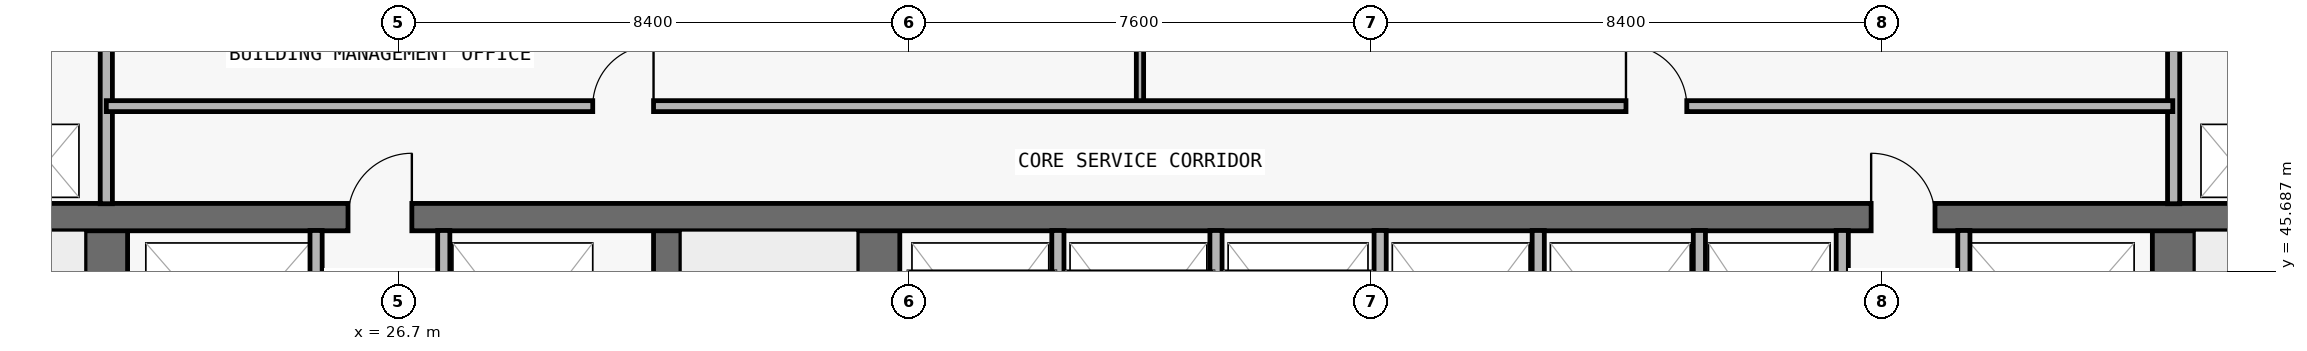
"""IFC4 building model, lengths in metres.
Left out: names, types, materials, properties, quantities, classifications, styles, units other than length and angle.
Written with IfcOpenShell. Run it as: python <this file> out.ifc"""

import sys

from ifc_helpers import new_model, si_unit, direction, frame, frame_2d, origin, place, context, subcontext, project, spatial, rectangle, extrude, element, fill, save


model = new_model("IFC4")
c1 = context("Model", 3, precision=1e-05, world=origin(), true_north=direction((0.0, 1.0)))
c2 = subcontext(c1, "Body", "Model", "MODEL_VIEW")
j1 = project(units=[si_unit("LENGTHUNIT", "METRE"), si_unit("PLANEANGLEUNIT", "RADIAN")], contexts=[c1])
p1 = place(None, origin())
s1 = spatial("IfcSite", under=j1, at=p1, CompositionType="ELEMENT")
p2 = place(p1, origin())
s2 = spatial("IfcBuilding", under=s1, at=p2, CompositionType="ELEMENT")
p3 = place(p2, frame((0.0, 0.0, 33.3)))
s3 = spatial("IfcBuildingStorey", under=s2, at=p3, CompositionType="ELEMENT", Elevation=33.3)
p4 = place(p3, frame((21.9, 36.9, 0.0), z_axis=(0.0, 0.0, 1.0), x_axis=(0.0, 1.0, 0.0)))
e1 = element("IfcWall", 1, at=p4, inside=s3, PredefinedType="SHEAR", context=c2, shape_type="SweptSolid", body=[
    extrude(rectangle(XDim=9.675, YDim=0.7, at=frame_2d((4.837, 0.0))), origin(), (0.0, 0.0, 1.0), 3.05),
])
p5 = place(p4, frame((0.65, 0.0, 0.0)))
e2 = element("IfcOpeningElement", 2, at=p5, cuts=e1, PredefinedType="OPENING", context=c2, shape_type="SweptSolid", body=[
    extrude(rectangle(XDim=1.1, YDim=2.15, at=frame_2d((0.55, 1.075))), frame((0.0, 0.36, 0.0), z_axis=(0.0, -1.0, 0.0), x_axis=(1.0, 0.0, 0.0)), (0.0, 0.0, 1.0), 0.72),
])
p6 = place(p3, frame((55.9, 36.9, 0.0), z_axis=(0.0, 0.0, 1.0), x_axis=(0.0, 1.0, 0.0)))
e3 = element("IfcWall", 3, at=p6, inside=s3, PredefinedType="SHEAR", context=c2, shape_type="SweptSolid", body=[
    extrude(rectangle(XDim=9.675, YDim=0.7, at=frame_2d((4.837, 0.0))), origin(), (0.0, 0.0, 1.0), 3.05),
])
p7 = place(p6, frame((0.65, 0.0, 0.0)))
e4 = element("IfcOpeningElement", 4, at=p7, cuts=e3, PredefinedType="OPENING", context=c2, shape_type="SweptSolid", body=[
    extrude(rectangle(XDim=1.1, YDim=2.15, at=frame_2d((0.55, 1.075))), frame((0.0, 0.36, 0.0), z_axis=(0.0, -1.0, 0.0), x_axis=(1.0, 0.0, 0.0)), (0.0, 0.0, 1.0), 0.72),
])
p8 = place(p3, frame((31.125, 36.9, 0.0), z_axis=(0.0, 0.0, 1.0), x_axis=(0.0, 1.0, 0.0)))
e5 = element("IfcWall", 5, at=p8, inside=s3, PredefinedType="SHEAR", context=c2, shape_type="SweptSolid", body=[
    extrude(rectangle(XDim=9.675, YDim=0.45, at=frame_2d((4.837, 0.0))), origin(), (0.0, 0.0, 1.0), 3.05),
])
p9 = place(p3, frame((34.6, 36.9, 0.0), z_axis=(0.0, 0.0, 1.0), x_axis=(0.0, 1.0, 0.0)))
e6 = element("IfcWall", 6, at=p9, inside=s3, PredefinedType="SHEAR", context=c2, shape_type="SweptSolid", body=[
    extrude(rectangle(XDim=9.675, YDim=0.7, at=frame_2d((4.837, 0.0))), origin(), (0.0, 0.0, 1.0), 3.05),
])
p10 = place(p3, frame((18.2, 46.575, 0.0), z_axis=(0.0, 0.0, 1.0), x_axis=(1.0, 0.0, 0.0)))
e7 = element("IfcWall", 7, at=p10, inside=s3, PredefinedType="SHEAR", context=c2, shape_type="SweptSolid", body=[
    extrude(rectangle(XDim=41.4, YDim=0.45, at=frame_2d((20.7, 0.0))), origin(), (0.0, 0.0, 1.0), 3.05),
])
p11 = place(p10, frame((7.675, 0.0, 0.0)))
e8 = element("IfcOpeningElement", 8, at=p11, cuts=e7, PredefinedType="OPENING", context=c2, shape_type="SweptSolid", body=[
    extrude(rectangle(XDim=1.05, YDim=2.15, at=frame_2d((0.525, 1.075))), frame((0.0, 0.235, 0.0), z_axis=(0.0, -1.0, 0.0), x_axis=(1.0, 0.0, 0.0)), (0.0, 0.0, 1.0), 0.47),
])
p12 = place(p10, frame((32.725, 0.0, 0.0)))
e9 = element("IfcOpeningElement", 9, at=p12, cuts=e7, PredefinedType="OPENING", context=c2, shape_type="SweptSolid", body=[
    extrude(rectangle(XDim=1.05, YDim=2.15, at=frame_2d((0.525, 1.075))), frame((0.0, 0.235, 0.0), z_axis=(0.0, -1.0, 0.0), x_axis=(1.0, 0.0, 0.0)), (0.0, 0.0, 1.0), 0.47),
])
p13 = place(p3, frame((21.9, 46.795, 0.0), z_axis=(0.0, 0.0, 1.0), x_axis=(0.0, 1.0, 0.0)))
e10 = element("IfcWall", 10, at=p13, inside=s3, PredefinedType="PARTITIONING", context=c2, shape_type="SweptSolid", body=[
    extrude(rectangle(XDim=3.06, YDim=0.2, at=frame_2d((1.53, 0.0))), origin(), (0.0, 0.0, 1.0), 3.05),
])
for number, where, z_axis, x_axis in (
    (11, (25.35, 43.17, 0.0), (0.0, 0.0, 1.0), (0.0, 1.0, 0.0)),
    (12, (27.45, 43.17, 0.0), (0.0, 0.0, 1.0), (0.0, 1.0, 0.0)),
    (13, (37.55, 43.17, 0.0), (0.0, 0.0, 1.0), (0.0, 1.0, 0.0)),
):
    element("IfcWall", number, at=place(p3, frame(where, z_axis=z_axis, x_axis=x_axis)), inside=s3, PredefinedType="PARTITIONING", context=c2, shape_type="SweptSolid", body=[
        extrude(rectangle(XDim=3.185, YDim=0.2, at=frame_2d((1.593, 0.0))), origin(), (0.0, 0.0, 1.0), 3.05),
    ])
p14 = place(p3, frame((38.9, 48.4, 0.0), z_axis=(0.0, 0.0, 1.0), x_axis=(0.0, 1.0, 0.0)))
e14 = element("IfcWall", 14, at=p14, inside=s3, PredefinedType="PARTITIONING", context=c2, shape_type="SweptSolid", body=[
    extrude(rectangle(XDim=1.455, YDim=0.12, at=frame_2d((0.728, 0.0))), origin(), (0.0, 0.0, 1.0), 3.05),
])
for number, where, z_axis, x_axis in (
    (15, (40.15, 43.17, 0.0), (0.0, 0.0, 1.0), (0.0, 1.0, 0.0)),
    (16, (42.85, 43.17, 0.0), (0.0, 0.0, 1.0), (0.0, 1.0, 0.0)),
    (17, (45.45, 43.17, 0.0), (0.0, 0.0, 1.0), (0.0, 1.0, 0.0)),
    (18, (48.1, 43.17, 0.0), (0.0, 0.0, 1.0), (0.0, 1.0, 0.0)),
    (19, (50.45, 43.17, 0.0), (0.0, 0.0, 1.0), (0.0, 1.0, 0.0)),
    (20, (52.45, 43.17, 0.0), (0.0, 0.0, 1.0), (0.0, 1.0, 0.0)),
):
    element("IfcWall", number, at=place(p3, frame(where, z_axis=z_axis, x_axis=x_axis)), inside=s3, PredefinedType="PARTITIONING", context=c2, shape_type="SweptSolid", body=[
        extrude(rectangle(XDim=3.185, YDim=0.2, at=frame_2d((1.593, 0.0))), origin(), (0.0, 0.0, 1.0), 3.05),
    ])
p15 = place(p3, frame((55.9, 46.795, 0.0), z_axis=(0.0, 0.0, 1.0), x_axis=(0.0, 1.0, 0.0)))
e21 = element("IfcWall", 21, at=p15, inside=s3, PredefinedType="PARTITIONING", context=c2, shape_type="SweptSolid", body=[
    extrude(rectangle(XDim=3.06, YDim=0.2, at=frame_2d((1.53, 0.0))), origin(), (0.0, 0.0, 1.0), 3.05),
])
p16 = place(p3, frame((21.9, 48.4, 0.0), z_axis=(0.0, 0.0, 1.0), x_axis=(1.0, 0.0, 0.0)))
e22 = element("IfcWall", 22, at=p16, inside=s3, PredefinedType="PARTITIONING", context=c2, shape_type="SweptSolid", body=[
    extrude(rectangle(XDim=33.986, YDim=0.18, at=frame_2d((16.993, 0.0))), origin(), (0.0, 0.0, 1.0), 3.05),
])
p17 = place(p16, frame((8.0, 0.0, 0.0)))
e23 = element("IfcOpeningElement", 23, at=p17, cuts=e22, PredefinedType="OPENING", context=c2, shape_type="SweptSolid", body=[
    extrude(rectangle(XDim=1.0, YDim=2.2, at=frame_2d((0.5, 1.1))), frame((0.0, 0.1, 0.0), z_axis=(0.0, -1.0, 0.0), x_axis=(1.0, 0.0, 0.0)), (0.0, 0.0, 1.0), 0.2),
])
p18 = place(p16, frame((24.993, 0.0, 0.0)))
e24 = element("IfcOpeningElement", 24, at=p18, cuts=e22, PredefinedType="OPENING", context=c2, shape_type="SweptSolid", body=[
    extrude(rectangle(XDim=1.0, YDim=2.2, at=frame_2d((0.5, 1.1))), frame((0.0, 0.1, 0.0), z_axis=(0.0, -1.0, 0.0), x_axis=(1.0, 0.0, 0.0)), (0.0, 0.0, 1.0), 0.2),
])
p19 = place(p11, origin())
e25 = element("IfcDoor", 25, at=p19, inside=s3, OperationType="SINGLE_SWING_RIGHT", PredefinedType="DOOR", context=c2, shape_type="SweptSolid", body=[
    extrude(rectangle(XDim=1.05, YDim=2.15, at=frame_2d((0.525, 1.075))), frame((0.0, 0.025, 0.0), z_axis=(0.0, -1.0, 0.0), x_axis=(1.0, 0.0, 0.0)), (0.0, 0.0, 1.0), 0.05),
])
fill(e8, e25)
p20 = place(p12, origin())
e26 = element("IfcDoor", 26, at=p20, inside=s3, OperationType="SINGLE_SWING_LEFT", PredefinedType="DOOR", context=c2, shape_type="SweptSolid", body=[
    extrude(rectangle(XDim=1.05, YDim=2.15, at=frame_2d((0.525, 1.075))), frame((0.0, 0.025, 0.0), z_axis=(0.0, -1.0, 0.0), x_axis=(1.0, 0.0, 0.0)), (0.0, 0.0, 1.0), 0.05),
])
fill(e9, e26)
p21 = place(p17, origin())
e27 = element("IfcDoor", 27, at=p21, inside=s3, OperationType="SINGLE_SWING_RIGHT", PredefinedType="DOOR", context=c2, shape_type="SweptSolid", body=[
    extrude(rectangle(XDim=1.0, YDim=2.2, at=frame_2d((0.5, 1.1))), frame((0.0, 0.025, 0.0), z_axis=(0.0, -1.0, 0.0), x_axis=(1.0, 0.0, 0.0)), (0.0, 0.0, 1.0), 0.05),
])
fill(e23, e27)
p22 = place(p18, origin())
e28 = element("IfcDoor", 28, at=p22, inside=s3, OperationType="SINGLE_SWING_LEFT", PredefinedType="DOOR", context=c2, shape_type="SweptSolid", body=[
    extrude(rectangle(XDim=1.0, YDim=2.2, at=frame_2d((0.5, 1.1))), frame((0.0, 0.025, 0.0), z_axis=(0.0, -1.0, 0.0), x_axis=(1.0, 0.0, 0.0)), (0.0, 0.0, 1.0), 0.05),
])
fill(e24, e28)
save(model, sys.argv[1])
